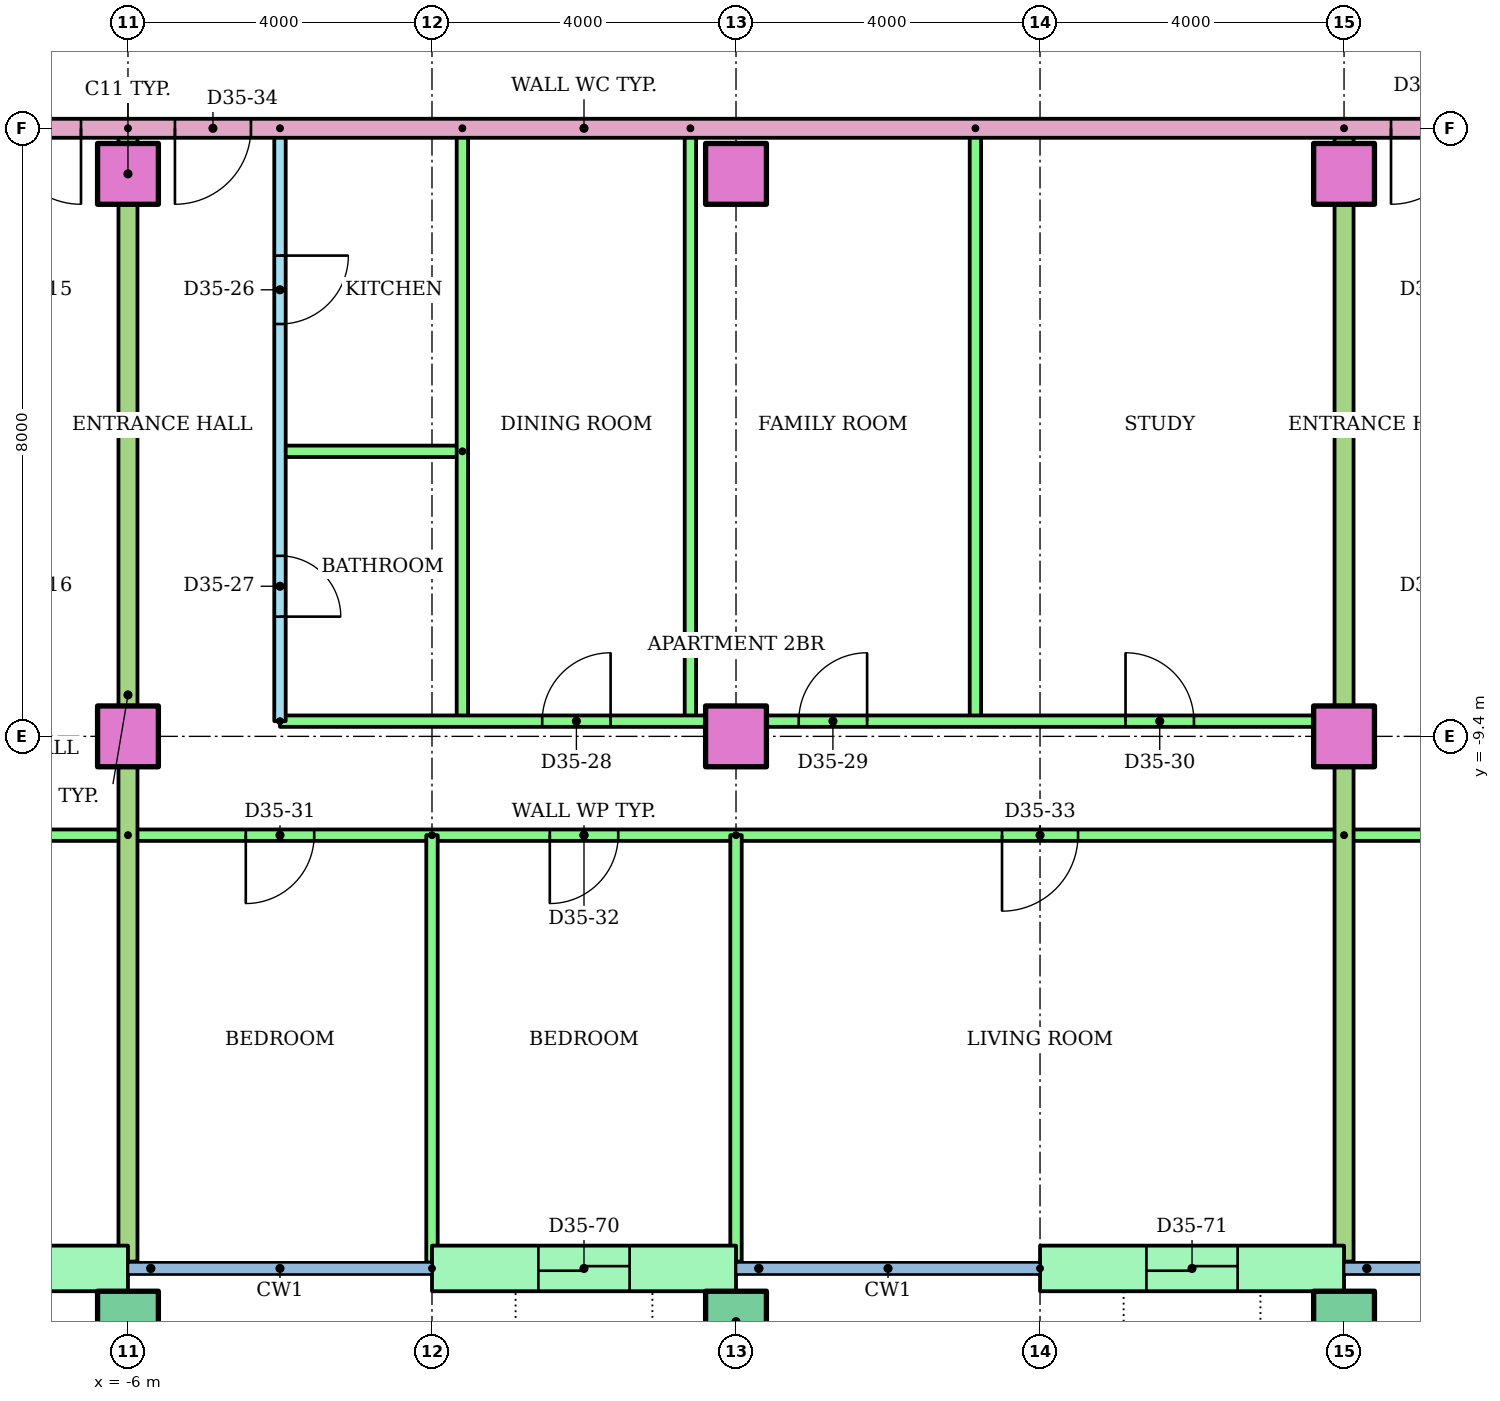
"""IFC4 building model, lengths in metres.
Left out: names, types, materials, properties, quantities, classifications, styles, units other than length and angle.
Written with IfcOpenShell. Run it as: python <this file> out.ifc"""

import sys

from ifc_helpers import new_model, si_unit, direction, frame, frame_2d, origin, origin_2d, place, context, subcontext, project, spatial, rectangle, hollow_rectangle, extrude, element, fill, save


model = new_model("IFC4")
c1 = context("Model", 3, precision=1e-05, world=origin(), true_north=direction((0.0, 1.0)))
c2 = subcontext(c1, "Body", "Model", "MODEL_VIEW")
j1 = project(units=[si_unit("LENGTHUNIT", "METRE"), si_unit("PLANEANGLEUNIT", "RADIAN")], contexts=[c1])
p1 = place(None, origin())
s1 = spatial("IfcSite", under=j1, at=p1, CompositionType="ELEMENT")
p2 = place(p1, origin())
s2 = spatial("IfcBuilding", under=s1, at=p2, CompositionType="ELEMENT")
p3 = place(p2, frame((0.0, 0.0, 135.8)))
s3 = spatial("IfcBuildingStorey", under=s2, at=p3, CompositionType="ELEMENT", Elevation=135.8)
for number, where in (
    (1, (-6.0, -17.1, 0.0)),
    (2, (2.0, -17.1, 0.0)),
    (3, (10.0, -17.1, 0.0)),
):
    element("IfcColumn", number, at=place(p3, frame(where)), inside=s3, PredefinedType="COLUMN", context=c2, shape_type="SweptSolid", body=[
        extrude(hollow_rectangle(XDim=0.8, YDim=0.8, WallThickness=0.04, at=origin_2d()), origin(), (0.0, 0.0, 1.0), 3.2),
    ])
for number, where in (
    (4, (-6.0, -9.4, 0.0)),
    (5, (2.0, -9.4, 0.0)),
    (6, (10.0, -9.4, 0.0)),
    (7, (-6.0, -2.0, 0.0)),
    (8, (2.0, -2.0, 0.0)),
    (9, (10.0, -2.0, 0.0)),
):
    element("IfcColumn", number, at=place(p3, frame(where)), inside=s3, PredefinedType="COLUMN", context=c2, shape_type="SweptSolid", body=[
        extrude(rectangle(XDim=0.8, YDim=0.8, at=origin_2d()), origin(), (0.0, 0.0, 1.0), 3.2),
    ])
p4 = place(p3, frame((-10.0, -16.4, 0.0)))
e10 = element("IfcWall", 10, at=p4, inside=s3, PredefinedType="STANDARD", context=c2, shape_type="SweptSolid", body=[
    extrude(rectangle(XDim=4.0, YDim=0.6, at=frame_2d((2.0, 0.0))), origin(), (0.0, 0.0, 1.0), 2.92),
])
p5 = place(p4, frame((1.4, 0.0, 0.0)))
e11 = element("IfcOpeningElement", 11, at=p5, cuts=e10, PredefinedType="OPENING", context=c2, shape_type="SweptSolid", body=[
    extrude(rectangle(XDim=1.2, YDim=2.1, at=frame_2d((0.6, 1.05))), frame((0.0, 0.31, 0.0), z_axis=(0.0, -1.0, 0.0), x_axis=(1.0, 0.0, 0.0)), (0.0, 0.0, 1.0), 0.62),
])
p6 = place(p3, frame((-2.0, -16.4, 0.0)))
e12 = element("IfcWall", 12, at=p6, inside=s3, PredefinedType="STANDARD", context=c2, shape_type="SweptSolid", body=[
    extrude(rectangle(XDim=4.0, YDim=0.6, at=frame_2d((2.0, 0.0))), origin(), (0.0, 0.0, 1.0), 2.92),
])
p7 = place(p6, frame((1.4, 0.0, 0.0)))
e13 = element("IfcOpeningElement", 13, at=p7, cuts=e12, PredefinedType="OPENING", context=c2, shape_type="SweptSolid", body=[
    extrude(rectangle(XDim=1.2, YDim=2.1, at=frame_2d((0.6, 1.05))), frame((0.0, 0.31, 0.0), z_axis=(0.0, -1.0, 0.0), x_axis=(1.0, 0.0, 0.0)), (0.0, 0.0, 1.0), 0.62),
])
p8 = place(p3, frame((6.0, -16.4, 0.0)))
e14 = element("IfcWall", 14, at=p8, inside=s3, PredefinedType="STANDARD", context=c2, shape_type="SweptSolid", body=[
    extrude(rectangle(XDim=4.0, YDim=0.6, at=frame_2d((2.0, 0.0))), origin(), (0.0, 0.0, 1.0), 2.92),
])
p9 = place(p8, frame((1.4, 0.0, 0.0)))
e15 = element("IfcOpeningElement", 15, at=p9, cuts=e14, PredefinedType="OPENING", context=c2, shape_type="SweptSolid", body=[
    extrude(rectangle(XDim=1.2, YDim=2.1, at=frame_2d((0.6, 1.05))), frame((0.0, 0.31, 0.0), z_axis=(0.0, -1.0, 0.0), x_axis=(1.0, 0.0, 0.0)), (0.0, 0.0, 1.0), 0.62),
])
p10 = place(p3, frame((-6.0, -10.7, 0.0), z_axis=(0.0, 0.0, 1.0), x_axis=(-1.0, 0.0, 0.0)))
e16 = element("IfcWall", 16, at=p10, inside=s3, PredefinedType="PARTITIONING", context=c2, shape_type="SweptSolid", body=[
    extrude(rectangle(XDim=26.72, YDim=0.15, at=frame_2d((13.36, 0.0))), origin(), (0.0, 0.0, 1.0), 2.4),
])
p11 = place(p10, frame((20.75, 0.0, 0.0)))
e17 = element("IfcOpeningElement", 17, at=p11, cuts=e16, PredefinedType="OPENING", context=c2, shape_type="SweptSolid", body=[
    extrude(rectangle(XDim=1.0, YDim=2.1, at=frame_2d((0.5, 1.05))), frame((0.0, 0.085, 0.0), z_axis=(0.0, -1.0, 0.0), x_axis=(1.0, 0.0, 0.0)), (0.0, 0.0, 1.0), 0.17),
])
p12 = place(p10, frame((13.55, 0.0, 0.0)))
e18 = element("IfcOpeningElement", 18, at=p12, cuts=e16, PredefinedType="OPENING", context=c2, shape_type="SweptSolid", body=[
    extrude(rectangle(XDim=0.9, YDim=2.1, at=frame_2d((0.45, 1.05))), frame((0.0, 0.085, 0.0), z_axis=(0.0, -1.0, 0.0), x_axis=(1.0, 0.0, 0.0)), (0.0, 0.0, 1.0), 0.17),
])
p13 = place(p10, frame((9.55, 0.0, 0.0)))
e19 = element("IfcOpeningElement", 19, at=p13, cuts=e16, PredefinedType="OPENING", context=c2, shape_type="SweptSolid", body=[
    extrude(rectangle(XDim=0.9, YDim=2.1, at=frame_2d((0.45, 1.05))), frame((0.0, 0.085, 0.0), z_axis=(0.0, -1.0, 0.0), x_axis=(1.0, 0.0, 0.0)), (0.0, 0.0, 1.0), 0.17),
])
p14 = place(p10, frame((5.55, 0.0, 0.0)))
e20 = element("IfcOpeningElement", 20, at=p14, cuts=e16, PredefinedType="OPENING", context=c2, shape_type="SweptSolid", body=[
    extrude(rectangle(XDim=0.9, YDim=2.1, at=frame_2d((0.45, 1.05))), frame((0.0, 0.085, 0.0), z_axis=(0.0, -1.0, 0.0), x_axis=(1.0, 0.0, 0.0)), (0.0, 0.0, 1.0), 0.17),
])
p15 = place(p10, frame((1.55, 0.0, 0.0)))
e21 = element("IfcOpeningElement", 21, at=p15, cuts=e16, PredefinedType="OPENING", context=c2, shape_type="SweptSolid", body=[
    extrude(rectangle(XDim=0.9, YDim=2.1, at=frame_2d((0.45, 1.05))), frame((0.0, 0.085, 0.0), z_axis=(0.0, -1.0, 0.0), x_axis=(1.0, 0.0, 0.0)), (0.0, 0.0, 1.0), 0.17),
])
p16 = place(p3, frame((-4.0, -1.4, 0.0), z_axis=(0.0, 0.0, 1.0), x_axis=(0.0, -1.0, 0.0)))
e22 = element("IfcWall", 22, at=p16, inside=s3, PredefinedType="PARTITIONING", context=c2, shape_type="SweptSolid", body=[
    extrude(rectangle(XDim=7.8, YDim=0.15, at=frame_2d((3.9, 0.0))), origin(), (0.0, 0.0, 1.0), 2.4),
])
p17 = place(p16, frame((1.675, 0.0, 0.0)))
e23 = element("IfcOpeningElement", 23, at=p17, cuts=e22, PredefinedType="OPENING", context=c2, shape_type="SweptSolid", body=[
    extrude(rectangle(XDim=0.9, YDim=2.1, at=frame_2d((0.45, 1.05))), frame((0.0, 0.085, 0.0), z_axis=(0.0, -1.0, 0.0), x_axis=(1.0, 0.0, 0.0)), (0.0, 0.0, 1.0), 0.17),
])
p18 = place(p16, frame((5.625, 0.0, 0.0)))
e24 = element("IfcOpeningElement", 24, at=p18, cuts=e22, PredefinedType="OPENING", context=c2, shape_type="SweptSolid", body=[
    extrude(rectangle(XDim=0.8, YDim=2.1, at=frame_2d((0.4, 1.05))), frame((0.0, 0.085, 0.0), z_axis=(0.0, -1.0, 0.0), x_axis=(1.0, 0.0, 0.0)), (0.0, 0.0, 1.0), 0.17),
])
p19 = place(p3, frame((-1.6, -5.65, 0.0), z_axis=(0.0, 0.0, 1.0), x_axis=(-1.0, 0.0, 0.0)))
e25 = element("IfcWall", 25, at=p19, inside=s3, PredefinedType="PARTITIONING", context=c2, shape_type="SweptSolid", body=[
    extrude(rectangle(XDim=2.4, YDim=0.15, at=frame_2d((1.2, 0.0))), origin(), (0.0, 0.0, 1.0), 2.4),
])
for number, where, z_axis, x_axis in (
    (26, (-1.6, -1.4, 0.0), (0.0, 0.0, 1.0), (0.0, -1.0, 0.0)),
    (27, (1.4, -1.4, 0.0), (0.0, 0.0, 1.0), (0.0, -1.0, 0.0)),
    (28, (5.15, -1.4, 0.0), (0.0, 0.0, 1.0), (0.0, -1.0, 0.0)),
):
    element("IfcWall", number, at=place(p3, frame(where, z_axis=z_axis, x_axis=x_axis)), inside=s3, PredefinedType="PARTITIONING", context=c2, shape_type="SweptSolid", body=[
        extrude(rectangle(XDim=7.8, YDim=0.15, at=frame_2d((3.9, 0.0))), origin(), (0.0, 0.0, 1.0), 2.4),
    ])
p20 = place(p3, frame((-4.0, -9.2, 0.0)))
e29 = element("IfcWall", 29, at=p20, inside=s3, PredefinedType="PARTITIONING", context=c2, shape_type="SweptSolid", body=[
    extrude(rectangle(XDim=14.0, YDim=0.15, at=frame_2d((7.0, 0.0))), origin(), (0.0, 0.0, 1.0), 2.4),
])
p21 = place(p20, frame((3.45, 0.0, 0.0)))
e30 = element("IfcOpeningElement", 30, at=p21, cuts=e29, PredefinedType="OPENING", context=c2, shape_type="SweptSolid", body=[
    extrude(rectangle(XDim=0.9, YDim=2.1, at=frame_2d((0.45, 1.05))), frame((0.0, 0.085, 0.0), z_axis=(0.0, -1.0, 0.0), x_axis=(1.0, 0.0, 0.0)), (0.0, 0.0, 1.0), 0.17),
])
p22 = place(p20, frame((6.825, 0.0, 0.0)))
e31 = element("IfcOpeningElement", 31, at=p22, cuts=e29, PredefinedType="OPENING", context=c2, shape_type="SweptSolid", body=[
    extrude(rectangle(XDim=0.9, YDim=2.1, at=frame_2d((0.45, 1.05))), frame((0.0, 0.085, 0.0), z_axis=(0.0, -1.0, 0.0), x_axis=(1.0, 0.0, 0.0)), (0.0, 0.0, 1.0), 0.17),
])
p23 = place(p20, frame((11.125, 0.0, 0.0)))
e32 = element("IfcOpeningElement", 32, at=p23, cuts=e29, PredefinedType="OPENING", context=c2, shape_type="SweptSolid", body=[
    extrude(rectangle(XDim=0.9, YDim=2.1, at=frame_2d((0.45, 1.05))), frame((0.0, 0.085, 0.0), z_axis=(0.0, -1.0, 0.0), x_axis=(1.0, 0.0, 0.0)), (0.0, 0.0, 1.0), 0.17),
])
p24 = place(p3, frame((10.0, -10.7, 0.0), z_axis=(0.0, 0.0, 1.0), x_axis=(-1.0, 0.0, 0.0)))
e33 = element("IfcWall", 33, at=p24, inside=s3, PredefinedType="PARTITIONING", context=c2, shape_type="SweptSolid", body=[
    extrude(rectangle(XDim=16.0, YDim=0.15, at=frame_2d((8.0, 0.0))), origin(), (0.0, 0.0, 1.0), 2.4),
])
p25 = place(p24, frame((13.55, 0.0, 0.0)))
e34 = element("IfcOpeningElement", 34, at=p25, cuts=e33, PredefinedType="OPENING", context=c2, shape_type="SweptSolid", body=[
    extrude(rectangle(XDim=0.9, YDim=2.1, at=frame_2d((0.45, 1.05))), frame((0.0, 0.085, 0.0), z_axis=(0.0, -1.0, 0.0), x_axis=(1.0, 0.0, 0.0)), (0.0, 0.0, 1.0), 0.17),
])
p26 = place(p24, frame((9.55, 0.0, 0.0)))
e35 = element("IfcOpeningElement", 35, at=p26, cuts=e33, PredefinedType="OPENING", context=c2, shape_type="SweptSolid", body=[
    extrude(rectangle(XDim=0.9, YDim=2.1, at=frame_2d((0.45, 1.05))), frame((0.0, 0.085, 0.0), z_axis=(0.0, -1.0, 0.0), x_axis=(1.0, 0.0, 0.0)), (0.0, 0.0, 1.0), 0.17),
])
p27 = place(p24, frame((3.5, 0.0, 0.0)))
e36 = element("IfcOpeningElement", 36, at=p27, cuts=e33, PredefinedType="OPENING", context=c2, shape_type="SweptSolid", body=[
    extrude(rectangle(XDim=1.0, YDim=2.1, at=frame_2d((0.5, 1.05))), frame((0.0, 0.085, 0.0), z_axis=(0.0, -1.0, 0.0), x_axis=(1.0, 0.0, 0.0)), (0.0, 0.0, 1.0), 0.17),
])
p28 = place(p3, frame((-2.0, -10.7, 0.0), z_axis=(0.0, 0.0, 1.0), x_axis=(0.0, -1.0, 0.0)))
e37 = element("IfcWall", 37, at=p28, inside=s3, PredefinedType="PARTITIONING", context=c2, shape_type="SweptSolid", body=[
    extrude(rectangle(XDim=5.621, YDim=0.15, at=frame_2d((2.811, 0.0))), origin(), (0.0, 0.0, 1.0), 2.4),
])
p29 = place(p3, frame((2.0, -10.7, 0.0), z_axis=(0.0, 0.0, 1.0), x_axis=(0.0, -1.0, 0.0)))
e38 = element("IfcWall", 38, at=p29, inside=s3, PredefinedType="PARTITIONING", context=c2, shape_type="SweptSolid", body=[
    extrude(rectangle(XDim=5.61, YDim=0.15, at=frame_2d((2.805, 0.0))), origin(), (0.0, 0.0, 1.0), 2.4),
])
p30 = place(p3, frame((-6.0, -1.4, 0.0), z_axis=(0.0, 0.0, 1.0), x_axis=(0.0, -1.0, 0.0)))
e39 = element("IfcWall", 39, at=p30, inside=s3, PredefinedType="PARTITIONING", context=c2, shape_type="SweptSolid", body=[
    extrude(rectangle(XDim=14.91, YDim=0.25, at=frame_2d((7.455, 0.0))), origin(), (0.0, 0.0, 1.0), 2.4),
])
p31 = place(p3, frame((32.72, -10.7, 0.0), z_axis=(0.0, 0.0, 1.0), x_axis=(-1.0, 0.0, 0.0)))
e40 = element("IfcWall", 40, at=p31, inside=s3, PredefinedType="PARTITIONING", context=c2, shape_type="SweptSolid", body=[
    extrude(rectangle(XDim=22.72, YDim=0.15, at=frame_2d((11.36, 0.0))), origin(), (0.0, 0.0, 1.0), 2.4),
])
p32 = place(p31, frame((20.27, 0.0, 0.0)))
e41 = element("IfcOpeningElement", 41, at=p32, cuts=e40, PredefinedType="OPENING", context=c2, shape_type="SweptSolid", body=[
    extrude(rectangle(XDim=0.9, YDim=2.1, at=frame_2d((0.45, 1.05))), frame((0.0, 0.085, 0.0), z_axis=(0.0, -1.0, 0.0), x_axis=(1.0, 0.0, 0.0)), (0.0, 0.0, 1.0), 0.17),
])
p33 = place(p31, frame((16.27, 0.0, 0.0)))
e42 = element("IfcOpeningElement", 42, at=p33, cuts=e40, PredefinedType="OPENING", context=c2, shape_type="SweptSolid", body=[
    extrude(rectangle(XDim=0.9, YDim=2.1, at=frame_2d((0.45, 1.05))), frame((0.0, 0.085, 0.0), z_axis=(0.0, -1.0, 0.0), x_axis=(1.0, 0.0, 0.0)), (0.0, 0.0, 1.0), 0.17),
])
p34 = place(p31, frame((10.22, 0.0, 0.0)))
e43 = element("IfcOpeningElement", 43, at=p34, cuts=e40, PredefinedType="OPENING", context=c2, shape_type="SweptSolid", body=[
    extrude(rectangle(XDim=1.0, YDim=2.1, at=frame_2d((0.5, 1.05))), frame((0.0, 0.085, 0.0), z_axis=(0.0, -1.0, 0.0), x_axis=(1.0, 0.0, 0.0)), (0.0, 0.0, 1.0), 0.17),
])
p35 = place(p31, frame((3.02, 0.0, 0.0)))
e44 = element("IfcOpeningElement", 44, at=p35, cuts=e40, PredefinedType="OPENING", context=c2, shape_type="SweptSolid", body=[
    extrude(rectangle(XDim=0.9, YDim=2.1, at=frame_2d((0.45, 1.05))), frame((0.0, 0.085, 0.0), z_axis=(0.0, -1.0, 0.0), x_axis=(1.0, 0.0, 0.0)), (0.0, 0.0, 1.0), 0.17),
])
p36 = place(p3, frame((10.0, -1.4, 0.0), z_axis=(0.0, 0.0, 1.0), x_axis=(0.0, -1.0, 0.0)))
e45 = element("IfcWall", 45, at=p36, inside=s3, PredefinedType="PARTITIONING", context=c2, shape_type="SweptSolid", body=[
    extrude(rectangle(XDim=14.91, YDim=0.25, at=frame_2d((7.455, 0.0))), origin(), (0.0, 0.0, 1.0), 2.4),
])
p37 = place(p3, frame((14.0, -1.4, 0.0), z_axis=(0.0, 0.0, 1.0), x_axis=(-1.0, 0.0, 0.0)))
e46 = element("IfcWall", 46, at=p37, inside=s3, PredefinedType="PARTITIONING", context=c2, shape_type="SweptSolid", body=[
    extrude(rectangle(XDim=28.0, YDim=0.25, at=frame_2d((14.0, 0.0))), origin(), (0.0, 0.0, 1.0), 2.4),
])
p38 = place(p37, frame((20.618, 0.0, 0.0)))
e47 = element("IfcOpeningElement", 47, at=p38, cuts=e46, PredefinedType="OPENING", context=c2, shape_type="SweptSolid", body=[
    extrude(rectangle(XDim=1.0, YDim=2.1, at=frame_2d((0.5, 1.05))), frame((0.0, 0.135, 0.0), z_axis=(0.0, -1.0, 0.0), x_axis=(1.0, 0.0, 0.0)), (0.0, 0.0, 1.0), 0.27),
])
p39 = place(p37, frame((18.382, 0.0, 0.0)))
e48 = element("IfcOpeningElement", 48, at=p39, cuts=e46, PredefinedType="OPENING", context=c2, shape_type="SweptSolid", body=[
    extrude(rectangle(XDim=1.0, YDim=2.1, at=frame_2d((0.5, 1.05))), frame((0.0, 0.135, 0.0), z_axis=(0.0, -1.0, 0.0), x_axis=(1.0, 0.0, 0.0)), (0.0, 0.0, 1.0), 0.27),
])
p40 = place(p37, frame((2.382, 0.0, 0.0)))
e49 = element("IfcOpeningElement", 49, at=p40, cuts=e46, PredefinedType="OPENING", context=c2, shape_type="SweptSolid", body=[
    extrude(rectangle(XDim=1.0, YDim=2.1, at=frame_2d((0.5, 1.05))), frame((0.0, 0.135, 0.0), z_axis=(0.0, -1.0, 0.0), x_axis=(1.0, 0.0, 0.0)), (0.0, 0.0, 1.0), 0.27),
])
p41 = place(p38, origin())
e50 = element("IfcDoor", 50, at=p41, inside=s3, OperationType="SINGLE_SWING_LEFT", PredefinedType="DOOR", context=c2, shape_type="SweptSolid", body=[
    extrude(rectangle(XDim=1.0, YDim=2.1, at=frame_2d((0.5, 1.05))), frame((0.0, 0.025, 0.0), z_axis=(0.0, -1.0, 0.0), x_axis=(1.0, 0.0, 0.0)), (0.0, 0.0, 1.0), 0.05),
])
fill(e47, e50)
p42 = place(p17, origin())
e51 = element("IfcDoor", 51, at=p42, inside=s3, OperationType="SINGLE_SWING_LEFT", PredefinedType="DOOR", context=c2, shape_type="SweptSolid", body=[
    extrude(rectangle(XDim=0.9, YDim=2.1, at=frame_2d((0.45, 1.05))), frame((0.0, 0.025, 0.0), z_axis=(0.0, -1.0, 0.0), x_axis=(1.0, 0.0, 0.0)), (0.0, 0.0, 1.0), 0.05),
])
fill(e23, e51)
p43 = place(p18, origin())
e52 = element("IfcDoor", 52, at=p43, inside=s3, OperationType="SINGLE_SWING_RIGHT", PredefinedType="DOOR", context=c2, shape_type="SweptSolid", body=[
    extrude(rectangle(XDim=0.8, YDim=2.1, at=frame_2d((0.4, 1.05))), frame((0.0, 0.025, 0.0), z_axis=(0.0, -1.0, 0.0), x_axis=(1.0, 0.0, 0.0)), (0.0, 0.0, 1.0), 0.05),
])
fill(e24, e52)
p44 = place(p21, origin())
e53 = element("IfcDoor", 53, at=p44, inside=s3, OperationType="SINGLE_SWING_RIGHT", PredefinedType="DOOR", context=c2, shape_type="SweptSolid", body=[
    extrude(rectangle(XDim=0.9, YDim=2.1, at=frame_2d((0.45, 1.05))), frame((0.0, 0.025, 0.0), z_axis=(0.0, -1.0, 0.0), x_axis=(1.0, 0.0, 0.0)), (0.0, 0.0, 1.0), 0.05),
])
fill(e30, e53)
p45 = place(p22, origin())
e54 = element("IfcDoor", 54, at=p45, inside=s3, OperationType="SINGLE_SWING_RIGHT", PredefinedType="DOOR", context=c2, shape_type="SweptSolid", body=[
    extrude(rectangle(XDim=0.9, YDim=2.1, at=frame_2d((0.45, 1.05))), frame((0.0, 0.025, 0.0), z_axis=(0.0, -1.0, 0.0), x_axis=(1.0, 0.0, 0.0)), (0.0, 0.0, 1.0), 0.05),
])
fill(e31, e54)
p46 = place(p23, origin())
e55 = element("IfcDoor", 55, at=p46, inside=s3, OperationType="SINGLE_SWING_LEFT", PredefinedType="DOOR", context=c2, shape_type="SweptSolid", body=[
    extrude(rectangle(XDim=0.9, YDim=2.1, at=frame_2d((0.45, 1.05))), frame((0.0, 0.025, 0.0), z_axis=(0.0, -1.0, 0.0), x_axis=(1.0, 0.0, 0.0)), (0.0, 0.0, 1.0), 0.05),
])
fill(e32, e55)
p47 = place(p25, origin())
e56 = element("IfcDoor", 56, at=p47, inside=s3, OperationType="SINGLE_SWING_RIGHT", PredefinedType="DOOR", context=c2, shape_type="SweptSolid", body=[
    extrude(rectangle(XDim=0.9, YDim=2.1, at=frame_2d((0.45, 1.05))), frame((0.0, 0.025, 0.0), z_axis=(0.0, -1.0, 0.0), x_axis=(1.0, 0.0, 0.0)), (0.0, 0.0, 1.0), 0.05),
])
fill(e34, e56)
p48 = place(p26, origin())
e57 = element("IfcDoor", 57, at=p48, inside=s3, OperationType="SINGLE_SWING_RIGHT", PredefinedType="DOOR", context=c2, shape_type="SweptSolid", body=[
    extrude(rectangle(XDim=0.9, YDim=2.1, at=frame_2d((0.45, 1.05))), frame((0.0, 0.025, 0.0), z_axis=(0.0, -1.0, 0.0), x_axis=(1.0, 0.0, 0.0)), (0.0, 0.0, 1.0), 0.05),
])
fill(e35, e57)
p49 = place(p27, origin())
e58 = element("IfcDoor", 58, at=p49, inside=s3, OperationType="SINGLE_SWING_RIGHT", PredefinedType="DOOR", context=c2, shape_type="SweptSolid", body=[
    extrude(rectangle(XDim=1.0, YDim=2.1, at=frame_2d((0.5, 1.05))), frame((0.0, 0.025, 0.0), z_axis=(0.0, -1.0, 0.0), x_axis=(1.0, 0.0, 0.0)), (0.0, 0.0, 1.0), 0.05),
])
fill(e36, e58)
p50 = place(p39, origin())
e59 = element("IfcDoor", 59, at=p50, inside=s3, OperationType="SINGLE_SWING_RIGHT", PredefinedType="DOOR", context=c2, shape_type="SweptSolid", body=[
    extrude(rectangle(XDim=1.0, YDim=2.1, at=frame_2d((0.5, 1.05))), frame((0.0, 0.025, 0.0), z_axis=(0.0, -1.0, 0.0), x_axis=(1.0, 0.0, 0.0)), (0.0, 0.0, 1.0), 0.05),
])
fill(e48, e59)
p51 = place(p40, origin())
e60 = element("IfcDoor", 60, at=p51, inside=s3, OperationType="SINGLE_SWING_RIGHT", PredefinedType="DOOR", context=c2, shape_type="SweptSolid", body=[
    extrude(rectangle(XDim=1.0, YDim=2.1, at=frame_2d((0.5, 1.05))), frame((0.0, 0.025, 0.0), z_axis=(0.0, -1.0, 0.0), x_axis=(1.0, 0.0, 0.0)), (0.0, 0.0, 1.0), 0.05),
])
fill(e49, e60)
p52 = place(p7, origin())
e61 = element("IfcDoor", 61, at=p52, inside=s3, OperationType="SLIDING_TO_LEFT", PredefinedType="DOOR", context=c2, shape_type="SweptSolid", body=[
    extrude(rectangle(XDim=1.2, YDim=2.1, at=frame_2d((0.6, 1.05))), frame((0.0, 0.025, 0.0), z_axis=(0.0, -1.0, 0.0), x_axis=(1.0, 0.0, 0.0)), (0.0, 0.0, 1.0), 0.05),
])
fill(e13, e61)
p53 = place(p9, origin())
e62 = element("IfcDoor", 62, at=p53, inside=s3, OperationType="SLIDING_TO_LEFT", PredefinedType="DOOR", context=c2, shape_type="SweptSolid", body=[
    extrude(rectangle(XDim=1.2, YDim=2.1, at=frame_2d((0.6, 1.05))), frame((0.0, 0.025, 0.0), z_axis=(0.0, -1.0, 0.0), x_axis=(1.0, 0.0, 0.0)), (0.0, 0.0, 1.0), 0.05),
])
fill(e15, e62)
save(model, sys.argv[1])
